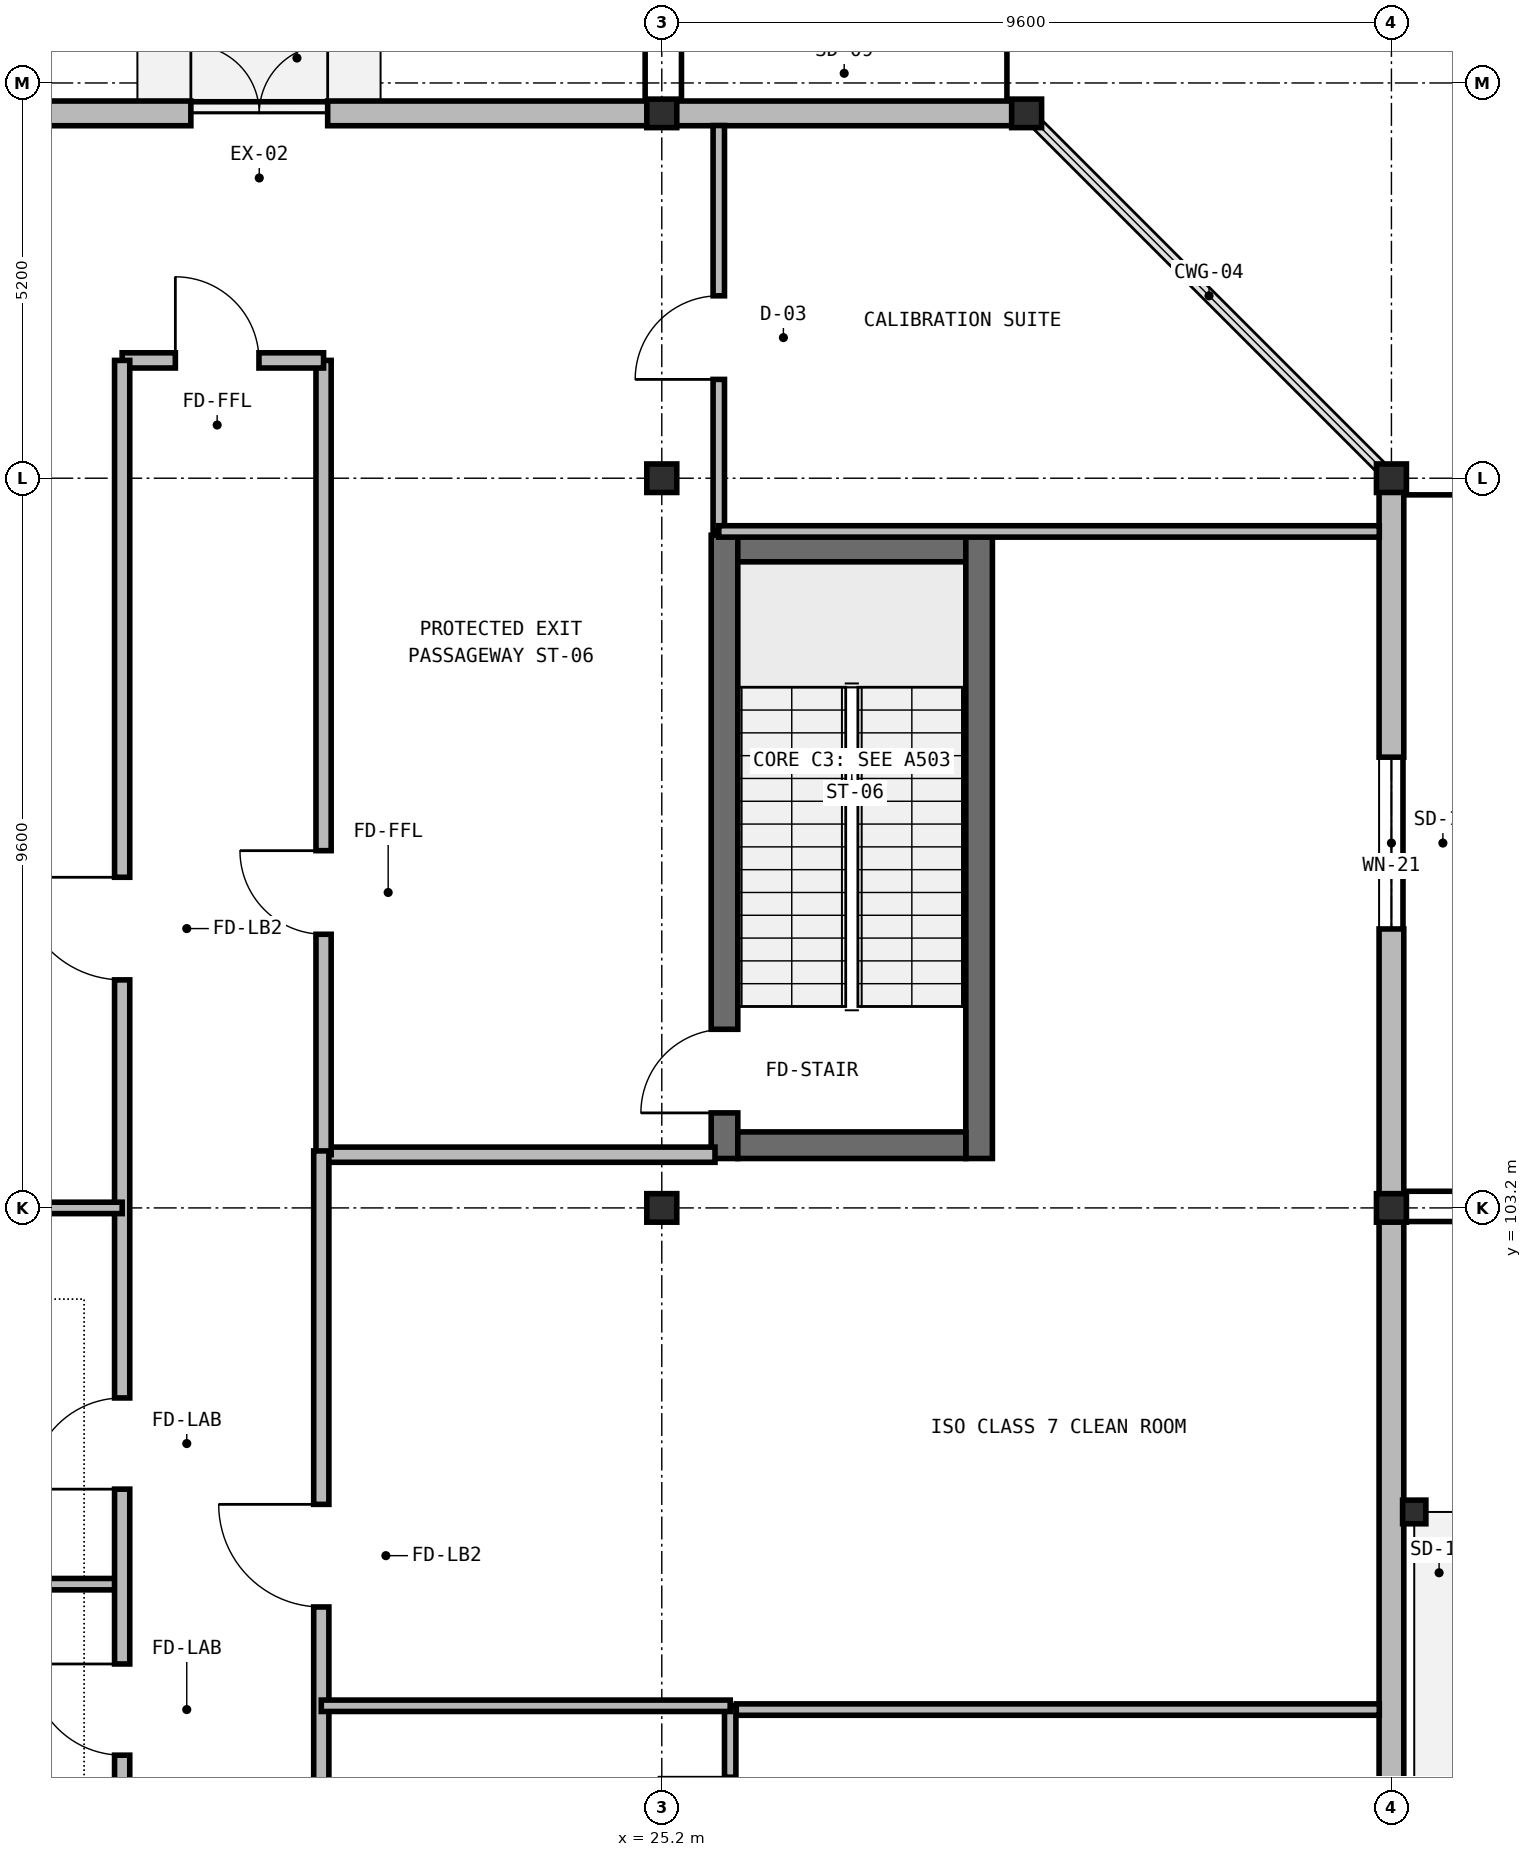
"""IFC4 building model, lengths in metres.
Left out: names, types, materials, properties, quantities, classifications, styles, units other than length and angle.
Written with IfcOpenShell. Run it as: python <this file> out.ifc"""

import sys

from ifc_helpers import new_model, si_unit, direction, frame, frame_2d, origin, origin_2d, place, context, subcontext, project, spatial, rectangle, i_section, extrude, element, fill, save


model = new_model("IFC4")
c1 = context("Model", 3, precision=1e-05, world=origin(), true_north=direction((0.0, 1.0)))
c2 = subcontext(c1, "Body", "Model", "MODEL_VIEW")
j1 = project(units=[si_unit("LENGTHUNIT", "METRE"), si_unit("PLANEANGLEUNIT", "RADIAN")], contexts=[c1])
p1 = place(None, origin())
s1 = spatial("IfcSite", under=j1, at=p1, CompositionType="ELEMENT")
p2 = place(p1, origin())
s2 = spatial("IfcBuilding", under=s1, at=p2, CompositionType="ELEMENT")
p3 = place(p2, origin())
s3 = spatial("IfcBuildingStorey", under=s2, at=p3, CompositionType="ELEMENT", Elevation=0.0)
p4 = place(p3, frame((26.025, 103.85, 0.0), z_axis=(0.0, 0.0, 1.0), x_axis=(0.0, 1.0, 0.0)))
e1 = element("IfcWall", 1, at=p4, inside=s3, PredefinedType="SHEAR", context=c2, shape_type="SweptSolid", body=[
    extrude(rectangle(XDim=8.2, YDim=0.35, at=frame_2d((4.1, 0.0))), origin(), (0.0, 0.0, 1.0), 5.25),
])
p5 = place(p4, frame((0.6, 0.0, 0.0)))
e2 = element("IfcOpeningElement", 2, at=p5, cuts=e1, PredefinedType="OPENING", context=c2, shape_type="SweptSolid", body=[
    extrude(rectangle(XDim=1.1, YDim=2.15, at=frame_2d((0.55, 1.075))), frame((0.0, 0.185, 0.0), z_axis=(0.0, -1.0, 0.0), x_axis=(1.0, 0.0, 0.0)), (0.0, 0.0, 1.0), 0.37),
])
p6 = place(p3, frame((26.2, 111.875, 0.0), z_axis=(0.0, 0.0, 1.0), x_axis=(1.0, 0.0, 0.0)))
e3 = element("IfcWall", 3, at=p6, inside=s3, PredefinedType="SHEAR", context=c2, shape_type="SweptSolid", body=[
    extrude(rectangle(XDim=3.0, YDim=0.35, at=frame_2d((1.5, 0.0))), origin(), (0.0, 0.0, 1.0), 5.25),
])
p7 = place(p3, frame((29.375, 112.05, 0.0), z_axis=(0.0, 0.0, 1.0), x_axis=(0.0, -1.0, 0.0)))
e4 = element("IfcWall", 4, at=p7, inside=s3, PredefinedType="SHEAR", context=c2, shape_type="SweptSolid", body=[
    extrude(rectangle(XDim=8.2, YDim=0.35, at=frame_2d((4.1, 0.0))), origin(), (0.0, 0.0, 1.0), 5.25),
])
p8 = place(p3, frame((29.2, 104.025, 0.0), z_axis=(0.0, 0.0, 1.0), x_axis=(-1.0, 0.0, 0.0)))
e5 = element("IfcWall", 5, at=p8, inside=s3, PredefinedType="SHEAR", context=c2, shape_type="SweptSolid", body=[
    extrude(rectangle(XDim=3.0, YDim=0.35, at=frame_2d((1.5, 0.0))), origin(), (0.0, 0.0, 1.0), 5.25),
])
for number, where, z_axis, x_axis in (
    (6, (25.2, 103.2, 0.0), (0.0, 0.0, 1.0), (1.0, 0.0, 0.0)),
    (7, (25.2, 112.8, 0.0), (0.0, 0.0, 1.0), (1.0, 0.0, 0.0)),
    (8, (25.2, 117.6, 0.0), (0.0, 0.0, 1.0), (1.0, 0.0, 0.0)),
    (9, (34.8, 103.2, 0.0), (0.0, 0.0, 1.0), (1.0, 0.0, 0.0)),
    (10, (34.8, 112.8, 0.0), (0.0, 0.0, 1.0), (1.0, 0.0, 0.0)),
    (11, (30.0, 117.6, 0.0), (0.0, 0.0, 1.0), (1.0, 0.0, 0.0)),
):
    element("IfcColumn", number, at=place(p3, frame(where, z_axis=z_axis, x_axis=x_axis)), inside=s3, PredefinedType="COLUMN", context=c2, shape_type="SweptSolid", body=[
        extrude(i_section(OverallWidth=0.394, OverallDepth=0.375, WebThickness=0.02, FlangeThickness=0.032, at=origin_2d()), origin(), (0.0, 0.0, 1.0), 5.25),
    ])
p9 = place(p3, frame((35.1, 99.2, 0.0), z_axis=(0.0, 0.0, 1.0), x_axis=(1.0, 0.0, 0.0)))
e12 = element("IfcColumn", 12, at=p9, inside=s3, PredefinedType="COLUMN", context=c2, shape_type="SweptSolid", body=[
    extrude(i_section(OverallWidth=0.306, OverallDepth=0.311, WebThickness=0.011, FlangeThickness=0.017, at=origin_2d()), origin(), (0.0, 0.0, 1.0), 5.25),
])
p10 = place(p3, frame((15.604, 117.6, 0.0), z_axis=(0.0, 0.0, 1.0), x_axis=(1.0, 0.0, 0.0)))
e13 = element("IfcWall", 13, at=p10, inside=s3, PredefinedType="SOLIDWALL", context=c2, shape_type="SweptSolid", body=[
    extrude(rectangle(XDim=9.592, YDim=0.325, at=frame_2d((4.796, 0.0))), origin(), (0.0, 0.0, 1.0), 4.444),
])
p11 = place(p10, frame((3.4, 0.0, 0.0)))
e14 = element("IfcOpeningElement", 14, at=p11, cuts=e13, PredefinedType="OPENING", context=c2, shape_type="SweptSolid", body=[
    extrude(rectangle(XDim=1.8, YDim=2.25, at=frame_2d((0.9, 1.125))), frame((0.0, 0.172, 0.0), z_axis=(0.0, -1.0, 0.0), x_axis=(1.0, 0.0, 0.0)), (0.0, 0.0, 1.0), 0.345),
])
p12 = place(p3, frame((25.204, 117.6, 0.0), z_axis=(0.0, 0.0, 1.0), x_axis=(1.0, 0.0, 0.0)))
e15 = element("IfcWall", 15, at=p12, inside=s3, PredefinedType="SOLIDWALL", context=c2, shape_type="SweptSolid", body=[
    extrude(rectangle(XDim=4.792, YDim=0.325, at=frame_2d((2.396, 0.0))), origin(), (0.0, 0.0, 1.0), 4.93),
])
p13 = place(p3, frame((34.8, 103.196, 0.0), z_axis=(0.0, 0.0, 1.0), x_axis=(0.0, -1.0, 0.0)))
e16 = element("IfcWall", 16, at=p13, inside=s3, PredefinedType="SOLIDWALL", context=c2, shape_type="SweptSolid", body=[
    extrude(rectangle(XDim=9.592, YDim=0.325, at=frame_2d((4.796, 0.0))), origin(), (0.0, 0.0, 1.0), 4.444),
])
p14 = place(p3, frame((34.8, 112.796, 0.0), z_axis=(0.0, 0.0, 1.0), x_axis=(0.0, -1.0, 0.0)))
e17 = element("IfcWall", 17, at=p14, inside=s3, PredefinedType="SOLIDWALL", context=c2, shape_type="SweptSolid", body=[
    extrude(rectangle(XDim=9.592, YDim=0.325, at=frame_2d((4.796, 0.0))), origin(), (0.0, 0.0, 1.0), 4.444),
])
p15 = place(p14, frame((3.666, 0.0, 0.95)))
e18 = element("IfcOpeningElement", 18, at=p15, cuts=e17, PredefinedType="OPENING", context=c2, shape_type="SweptSolid", body=[
    extrude(rectangle(XDim=2.26, YDim=1.6, at=frame_2d((1.13, 0.8))), frame((0.0, 0.172, 0.0), z_axis=(0.0, -1.0, 0.0), x_axis=(1.0, 0.0, 0.0)), (0.0, 0.0, 1.0), 0.345),
])
p16 = place(p3, frame((20.75, 103.9, 0.0), z_axis=(0.0, 0.0, 1.0), x_axis=(1.0, 0.0, 0.0)))
e19 = element("IfcWall", 19, at=p16, inside=s3, PredefinedType="SOLIDWALL", context=c2, shape_type="SweptSolid", body=[
    extrude(rectangle(XDim=5.15, YDim=0.2, at=frame_2d((2.575, 0.0))), origin(), (0.0, 0.0, 1.0), 4.93),
])
p17 = place(p3, frame((20.75, 103.9, 0.0), z_axis=(0.0, 0.0, 1.0), x_axis=(0.0, 1.0, 0.0)))
e20 = element("IfcWall", 20, at=p17, inside=s3, PredefinedType="SOLIDWALL", context=c2, shape_type="SweptSolid", body=[
    extrude(rectangle(XDim=10.45, YDim=0.2, at=frame_2d((5.225, 0.0))), origin(), (0.0, 0.0, 1.0), 4.93),
])
p18 = place(p17, frame((2.9, 0.0, 0.0)))
e21 = element("IfcOpeningElement", 21, at=p18, cuts=e20, PredefinedType="OPENING", context=c2, shape_type="SweptSolid", body=[
    extrude(rectangle(XDim=1.1, YDim=2.15, at=frame_2d((0.55, 1.075))), frame((0.0, 0.11, 0.0), z_axis=(0.0, -1.0, 0.0), x_axis=(1.0, 0.0, 0.0)), (0.0, 0.0, 1.0), 0.22),
])
p19 = place(p3, frame((18.1, 114.35, 0.0), z_axis=(0.0, 0.0, 1.0), x_axis=(1.0, 0.0, 0.0)))
e22 = element("IfcWall", 22, at=p19, inside=s3, PredefinedType="SOLIDWALL", context=c2, shape_type="SweptSolid", body=[
    extrude(rectangle(XDim=2.65, YDim=0.2, at=frame_2d((1.325, 0.0))), origin(), (0.0, 0.0, 1.0), 4.93),
])
p20 = place(p19, frame((0.7, 0.0, 0.0)))
e23 = element("IfcOpeningElement", 23, at=p20, cuts=e22, PredefinedType="OPENING", context=c2, shape_type="SweptSolid", body=[
    extrude(rectangle(XDim=1.1, YDim=2.15, at=frame_2d((0.55, 1.075))), frame((0.0, 0.11, 0.0), z_axis=(0.0, -1.0, 0.0), x_axis=(1.0, 0.0, 0.0)), (0.0, 0.0, 1.0), 0.22),
])
p21 = place(p3, frame((26.18, 96.6, 0.0), z_axis=(0.0, 0.0, 1.0), x_axis=(1.0, 0.0, 0.0)))
e24 = element("IfcWall", 24, at=p21, inside=s3, PredefinedType="PARTITIONING", context=c2, shape_type="SweptSolid", body=[
    extrude(rectangle(XDim=8.46, YDim=0.15, at=frame_2d((4.23, 0.0))), origin(), (0.0, 0.0, 1.0), 4.93),
])
p22 = place(p3, frame((26.1, 89.12, 0.0), z_axis=(0.0, 0.0, 1.0), x_axis=(0.0, 1.0, 0.0)))
e25 = element("IfcWall", 25, at=p22, inside=s3, PredefinedType="PARTITIONING", context=c2, shape_type="SweptSolid", body=[
    extrude(rectangle(XDim=7.53, YDim=0.15, at=frame_2d((3.765, 0.0))), origin(), (0.0, 0.0, 1.0), 4.93),
])
p23 = place(p22, frame((0.66, 0.0, 0.0)))
e26 = element("IfcOpeningElement", 26, at=p23, cuts=e25, PredefinedType="OPENING", context=c2, shape_type="SweptSolid", body=[
    extrude(rectangle(XDim=0.95, YDim=2.1, at=frame_2d((0.475, 1.05))), frame((0.0, 0.085, 0.0), z_axis=(0.0, -1.0, 0.0), x_axis=(1.0, 0.0, 0.0)), (0.0, 0.0, 1.0), 0.17),
])
p24 = place(p22, frame((2.44, 0.0, 0.0)))
e27 = element("IfcOpeningElement", 27, at=p24, cuts=e25, PredefinedType="OPENING", context=c2, shape_type="SweptSolid", body=[
    extrude(rectangle(XDim=0.95, YDim=2.1, at=frame_2d((0.475, 1.05))), frame((0.0, 0.085, 0.0), z_axis=(0.0, -1.0, 0.0), x_axis=(1.0, 0.0, 0.0)), (0.0, 0.0, 1.0), 0.17),
])
p25 = place(p22, frame((5.64, 0.0, 0.0)))
e28 = element("IfcOpeningElement", 28, at=p25, cuts=e25, PredefinedType="OPENING", context=c2, shape_type="SweptSolid", body=[
    extrude(rectangle(XDim=0.95, YDim=2.1, at=frame_2d((0.475, 1.05))), frame((0.0, 0.085, 0.0), z_axis=(0.0, -1.0, 0.0), x_axis=(1.0, 0.0, 0.0)), (0.0, 0.0, 1.0), 0.17),
])
p26 = place(p3, frame((25.95, 112.1, 0.0), z_axis=(0.0, 0.0, 1.0), x_axis=(0.0, 1.0, 0.0)))
e29 = element("IfcWall", 29, at=p26, inside=s3, PredefinedType="PARTITIONING", context=c2, shape_type="SweptSolid", body=[
    extrude(rectangle(XDim=5.34, YDim=0.15, at=frame_2d((2.67, 0.0))), origin(), (0.0, 0.0, 1.0), 4.93),
])
p27 = place(p26, frame((2.0, 0.0, 0.0)))
e30 = element("IfcOpeningElement", 30, at=p27, cuts=e29, PredefinedType="OPENING", context=c2, shape_type="SweptSolid", body=[
    extrude(rectangle(XDim=1.1, YDim=2.2, at=frame_2d((0.55, 1.1))), frame((0.0, 0.085, 0.0), z_axis=(0.0, -1.0, 0.0), x_axis=(1.0, 0.0, 0.0)), (0.0, 0.0, 1.0), 0.17),
])
p28 = place(p3, frame((25.95, 112.1, 0.0), z_axis=(0.0, 0.0, 1.0), x_axis=(1.0, 0.0, 0.0)))
e31 = element("IfcWall", 31, at=p28, inside=s3, PredefinedType="PARTITIONING", context=c2, shape_type="SweptSolid", body=[
    extrude(rectangle(XDim=8.69, YDim=0.15, at=frame_2d((4.345, 0.0))), origin(), (0.0, 0.0, 1.0), 4.93),
])
p29 = place(p3, frame((12.75, 98.25, 0.0), z_axis=(0.0, 0.0, 1.0), x_axis=(1.0, 0.0, 0.0)))
e32 = element("IfcWall", 32, at=p29, inside=s3, PredefinedType="PARTITIONING", context=c2, shape_type="SweptSolid", body=[
    extrude(rectangle(XDim=5.35, YDim=0.15, at=frame_2d((2.675, 0.0))), origin(), (0.0, 0.0, 1.0), 4.93),
])
p30 = place(p3, frame((18.1, 95.0, 0.0), z_axis=(0.0, 0.0, 1.0), x_axis=(0.0, 1.0, 0.0)))
e33 = element("IfcWall", 33, at=p30, inside=s3, PredefinedType="SOLIDWALL", context=c2, shape_type="SweptSolid", body=[
    extrude(rectangle(XDim=19.35, YDim=0.2, at=frame_2d((9.675, 0.0))), origin(), (0.0, 0.0, 1.0), 4.93),
])
p31 = place(p30, frame((1.0, 0.0, 0.0)))
e34 = element("IfcOpeningElement", 34, at=p31, cuts=e33, PredefinedType="OPENING", context=c2, shape_type="SweptSolid", body=[
    extrude(rectangle(XDim=1.2, YDim=2.2, at=frame_2d((0.6, 1.1))), frame((0.0, 0.11, 0.0), z_axis=(0.0, -1.0, 0.0), x_axis=(1.0, 0.0, 0.0)), (0.0, 0.0, 1.0), 0.22),
])
p32 = place(p30, frame((4.5, 0.0, 0.0)))
e35 = element("IfcOpeningElement", 35, at=p32, cuts=e33, PredefinedType="OPENING", context=c2, shape_type="SweptSolid", body=[
    extrude(rectangle(XDim=1.2, YDim=2.2, at=frame_2d((0.6, 1.1))), frame((0.0, 0.11, 0.0), z_axis=(0.0, -1.0, 0.0), x_axis=(1.0, 0.0, 0.0)), (0.0, 0.0, 1.0), 0.22),
])
p33 = place(p30, frame((11.2, 0.0, 0.0)))
e36 = element("IfcOpeningElement", 36, at=p33, cuts=e33, PredefinedType="OPENING", context=c2, shape_type="SweptSolid", body=[
    extrude(rectangle(XDim=1.35, YDim=2.2, at=frame_2d((0.675, 1.1))), frame((0.0, 0.11, 0.0), z_axis=(0.0, -1.0, 0.0), x_axis=(1.0, 0.0, 0.0)), (0.0, 0.0, 1.0), 0.22),
])
p34 = place(p3, frame((20.72, 91.15, 0.0), z_axis=(0.0, 0.0, 1.0), x_axis=(0.0, 1.0, 0.0)))
e37 = element("IfcWall", 37, at=p34, inside=s3, PredefinedType="SOLIDWALL", context=c2, shape_type="SweptSolid", body=[
    extrude(rectangle(XDim=12.8, YDim=0.2, at=frame_2d((6.4, 0.0))), origin(), (0.0, 0.0, 1.0), 4.93),
])
p35 = place(p34, frame((1.8, 0.0, 0.0)))
e38 = element("IfcOpeningElement", 38, at=p35, cuts=e37, PredefinedType="OPENING", context=c2, shape_type="SweptSolid", body=[
    extrude(rectangle(XDim=1.2, YDim=2.2, at=frame_2d((0.6, 1.1))), frame((0.0, 0.11, 0.0), z_axis=(0.0, -1.0, 0.0), x_axis=(1.0, 0.0, 0.0)), (0.0, 0.0, 1.0), 0.22),
])
p36 = place(p34, frame((6.8, 0.0, 0.0)))
e39 = element("IfcOpeningElement", 39, at=p36, cuts=e37, PredefinedType="OPENING", context=c2, shape_type="SweptSolid", body=[
    extrude(rectangle(XDim=1.35, YDim=2.2, at=frame_2d((0.675, 1.1))), frame((0.0, 0.11, 0.0), z_axis=(0.0, -1.0, 0.0), x_axis=(1.0, 0.0, 0.0)), (0.0, 0.0, 1.0), 0.22),
])
p37 = place(p3, frame((20.72, 96.65, 0.0), z_axis=(0.0, 0.0, 1.0), x_axis=(1.0, 0.0, 0.0)))
e40 = element("IfcWall", 40, at=p37, inside=s3, PredefinedType="PARTITIONING", context=c2, shape_type="SweptSolid", body=[
    extrude(rectangle(XDim=5.38, YDim=0.15, at=frame_2d((2.69, 0.0))), origin(), (0.0, 0.0, 1.0), 4.93),
])
p38 = place(p3, frame((15.55, 103.2, 0.0), z_axis=(0.0, 0.0, 1.0), x_axis=(1.0, 0.0, 0.0)))
e41 = element("IfcWall", 41, at=p38, inside=s3, PredefinedType="PARTITIONING", context=c2, shape_type="SweptSolid", body=[
    extrude(rectangle(XDim=2.55, YDim=0.15, at=frame_2d((1.275, 0.0))), origin(), (0.0, 0.0, 1.0), 4.376),
])
p39 = place(p11, origin())
e42 = element("IfcDoor", 42, at=p39, inside=s3, OperationType="DOUBLE_DOOR_SINGLE_SWING", PredefinedType="DOOR", context=c2, shape_type="SweptSolid", body=[
    extrude(rectangle(XDim=1.8, YDim=2.25, at=frame_2d((0.9, 1.125))), frame((0.0, 0.025, 0.0), z_axis=(0.0, -1.0, 0.0), x_axis=(1.0, 0.0, 0.0)), (0.0, 0.0, 1.0), 0.05),
])
fill(e14, e42)
p40 = place(p15, origin())
e43 = element("IfcWindow", 43, at=p40, inside=s3, PartitioningType="SINGLE_PANEL", PredefinedType="WINDOW", context=c2, shape_type="SweptSolid", body=[
    extrude(rectangle(XDim=2.26, YDim=1.6, at=frame_2d((1.13, 0.8))), frame((0.0, 0.03, 0.0), z_axis=(0.0, -1.0, 0.0), x_axis=(1.0, 0.0, 0.0)), (0.0, 0.0, 1.0), 0.06),
])
fill(e18, e43)
p41 = place(p5, origin())
e44 = element("IfcDoor", 44, at=p41, inside=s3, OperationType="SINGLE_SWING_LEFT", PredefinedType="DOOR", context=c2, shape_type="SweptSolid", body=[
    extrude(rectangle(XDim=1.1, YDim=2.15, at=frame_2d((0.55, 1.075))), frame((0.0, 0.025, 0.0), z_axis=(0.0, -1.0, 0.0), x_axis=(1.0, 0.0, 0.0)), (0.0, 0.0, 1.0), 0.05),
])
fill(e2, e44)
p42 = place(p18, origin())
e45 = element("IfcDoor", 45, at=p42, inside=s3, OperationType="SINGLE_SWING_RIGHT", PredefinedType="DOOR", context=c2, shape_type="SweptSolid", body=[
    extrude(rectangle(XDim=1.1, YDim=2.15, at=frame_2d((0.55, 1.075))), frame((0.0, 0.025, 0.0), z_axis=(0.0, -1.0, 0.0), x_axis=(1.0, 0.0, 0.0)), (0.0, 0.0, 1.0), 0.05),
])
fill(e21, e45)
p43 = place(p20, origin())
e46 = element("IfcDoor", 46, at=p43, inside=s3, OperationType="SINGLE_SWING_LEFT", PredefinedType="DOOR", context=c2, shape_type="SweptSolid", body=[
    extrude(rectangle(XDim=1.1, YDim=2.15, at=frame_2d((0.55, 1.075))), frame((0.0, 0.025, 0.0), z_axis=(0.0, -1.0, 0.0), x_axis=(1.0, 0.0, 0.0)), (0.0, 0.0, 1.0), 0.05),
])
fill(e23, e46)
p44 = place(p25, origin())
e47 = element("IfcDoor", 47, at=p44, inside=s3, OperationType="SINGLE_SWING_RIGHT", PredefinedType="DOOR", context=c2, shape_type="SweptSolid", body=[
    extrude(rectangle(XDim=0.95, YDim=2.1, at=frame_2d((0.475, 1.05))), frame((0.0, 0.025, 0.0), z_axis=(0.0, -1.0, 0.0), x_axis=(1.0, 0.0, 0.0)), (0.0, 0.0, 1.0), 0.05),
])
fill(e28, e47)
p45 = place(p27, origin())
e48 = element("IfcDoor", 48, at=p45, inside=s3, OperationType="SINGLE_SWING_LEFT", PredefinedType="DOOR", context=c2, shape_type="SweptSolid", body=[
    extrude(rectangle(XDim=1.1, YDim=2.2, at=frame_2d((0.55, 1.1))), frame((0.0, 0.025, 0.0), z_axis=(0.0, -1.0, 0.0), x_axis=(1.0, 0.0, 0.0)), (0.0, 0.0, 1.0), 0.05),
])
fill(e30, e48)
p46 = place(p31, origin())
e49 = element("IfcDoor", 49, at=p46, inside=s3, OperationType="SINGLE_SWING_RIGHT", PredefinedType="DOOR", context=c2, shape_type="SweptSolid", body=[
    extrude(rectangle(XDim=1.2, YDim=2.2, at=frame_2d((0.6, 1.1))), frame((0.0, 0.025, 0.0), z_axis=(0.0, -1.0, 0.0), x_axis=(1.0, 0.0, 0.0)), (0.0, 0.0, 1.0), 0.05),
])
fill(e34, e49)
p47 = place(p32, origin())
e50 = element("IfcDoor", 50, at=p47, inside=s3, OperationType="SINGLE_SWING_LEFT", PredefinedType="DOOR", context=c2, shape_type="SweptSolid", body=[
    extrude(rectangle(XDim=1.2, YDim=2.2, at=frame_2d((0.6, 1.1))), frame((0.0, 0.025, 0.0), z_axis=(0.0, -1.0, 0.0), x_axis=(1.0, 0.0, 0.0)), (0.0, 0.0, 1.0), 0.05),
])
fill(e35, e50)
p48 = place(p33, origin())
e51 = element("IfcDoor", 51, at=p48, inside=s3, OperationType="SINGLE_SWING_RIGHT", PredefinedType="DOOR", context=c2, shape_type="SweptSolid", body=[
    extrude(rectangle(XDim=1.35, YDim=2.2, at=frame_2d((0.675, 1.1))), frame((0.0, 0.025, 0.0), z_axis=(0.0, -1.0, 0.0), x_axis=(1.0, 0.0, 0.0)), (0.0, 0.0, 1.0), 0.05),
])
fill(e36, e51)
p49 = place(p36, origin())
e52 = element("IfcDoor", 52, at=p49, inside=s3, OperationType="SINGLE_SWING_RIGHT", PredefinedType="DOOR", context=c2, shape_type="SweptSolid", body=[
    extrude(rectangle(XDim=1.35, YDim=2.2, at=frame_2d((0.675, 1.1))), frame((0.0, 0.025, 0.0), z_axis=(0.0, -1.0, 0.0), x_axis=(1.0, 0.0, 0.0)), (0.0, 0.0, 1.0), 0.05),
])
fill(e39, e52)
save(model, sys.argv[1])
